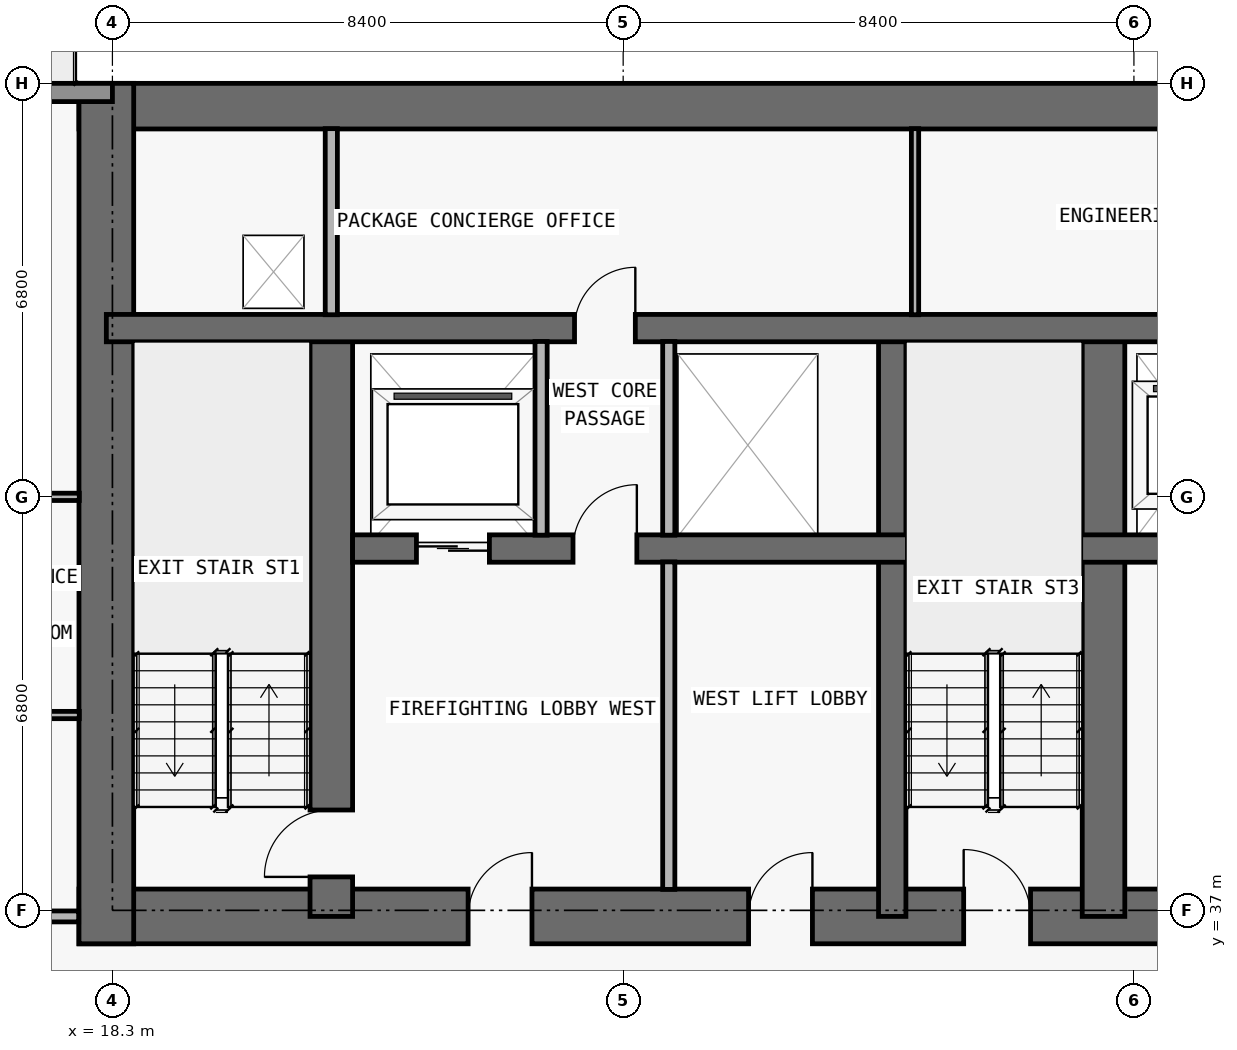
"""IFC4 building model, lengths in metres.
Left out: names, types, materials, properties, quantities, classifications, styles, units other than length and angle.
Written with IfcOpenShell. Run it as: python <this file> out.ifc"""

import sys

from ifc_helpers import new_model, si_unit, direction, frame, frame_2d, origin, place, context, subcontext, project, spatial, rectangle, extrude, element, fill, save


model = new_model("IFC4")
c1 = context("Model", 3, precision=1e-05, world=origin(), true_north=direction((0.0, 1.0)))
c2 = subcontext(c1, "Body", "Model", "MODEL_VIEW")
j1 = project(units=[si_unit("LENGTHUNIT", "METRE"), si_unit("PLANEANGLEUNIT", "RADIAN")], contexts=[c1])
p1 = place(None, origin())
s1 = spatial("IfcSite", under=j1, at=p1, CompositionType="ELEMENT")
p2 = place(p1, origin())
s2 = spatial("IfcBuilding", under=s1, at=p2, CompositionType="ELEMENT")
p3 = place(p2, frame((0.0, 0.0, 76.2)))
s3 = spatial("IfcBuildingStorey", under=s2, at=p3, CompositionType="ELEMENT", Elevation=76.2)
p4 = place(p3, frame((17.75, 36.9, 0.0), z_axis=(0.0, 0.0, 1.0), x_axis=(1.0, 0.0, 0.0)))
e1 = element("IfcWall", 1, at=p4, inside=s3, PredefinedType="SHEAR", context=c2, shape_type="SweptSolid", body=[
    extrude(rectangle(XDim=42.3, YDim=0.9, at=frame_2d((21.15, 0.0))), origin(), (0.0, 0.0, 1.0), 3.0),
])
p5 = place(p4, frame((14.55, 0.0, 0.0)))
e2 = element("IfcOpeningElement", 2, at=p5, cuts=e1, PredefinedType="OPENING", context=c2, shape_type="SweptSolid", body=[
    extrude(rectangle(XDim=1.1, YDim=2.15, at=frame_2d((0.55, 1.075))), frame((0.0, 0.46, 0.0), z_axis=(0.0, -1.0, 0.0), x_axis=(1.0, 0.0, 0.0)), (0.0, 0.0, 1.0), 0.92),
])
p6 = place(p4, frame((6.4, 0.0, 0.0)))
e3 = element("IfcOpeningElement", 3, at=p6, cuts=e1, PredefinedType="OPENING", context=c2, shape_type="SweptSolid", body=[
    extrude(rectangle(XDim=1.05, YDim=2.15, at=frame_2d((0.525, 1.075))), frame((0.0, 0.46, 0.0), z_axis=(0.0, -1.0, 0.0), x_axis=(1.0, 0.0, 0.0)), (0.0, 0.0, 1.0), 0.92),
])
p7 = place(p4, frame((34.9, 0.0, 0.0)))
e4 = element("IfcOpeningElement", 4, at=p7, cuts=e1, PredefinedType="OPENING", context=c2, shape_type="SweptSolid", body=[
    extrude(rectangle(XDim=1.05, YDim=2.15, at=frame_2d((0.525, 1.075))), frame((0.0, 0.46, 0.0), z_axis=(0.0, -1.0, 0.0), x_axis=(1.0, 0.0, 0.0)), (0.0, 0.0, 1.0), 0.92),
])
p8 = place(p4, frame((11.012, 0.0, 0.0)))
e5 = element("IfcOpeningElement", 5, at=p8, cuts=e1, PredefinedType="OPENING", context=c2, shape_type="SweptSolid", body=[
    extrude(rectangle(XDim=1.05, YDim=2.15, at=frame_2d((0.525, 1.075))), frame((0.0, 0.46, 0.0), z_axis=(0.0, -1.0, 0.0), x_axis=(1.0, 0.0, 0.0)), (0.0, 0.0, 1.0), 0.92),
])
p9 = place(p4, frame((24.25, 0.0, 0.0)))
e6 = element("IfcOpeningElement", 6, at=p9, cuts=e1, PredefinedType="OPENING", context=c2, shape_type="SweptSolid", body=[
    extrude(rectangle(XDim=1.05, YDim=2.15, at=frame_2d((0.525, 1.075))), frame((0.0, 0.46, 0.0), z_axis=(0.0, -1.0, 0.0), x_axis=(1.0, 0.0, 0.0)), (0.0, 0.0, 1.0), 0.92),
])
p10 = place(p3, frame((17.75, 50.225, 0.0), z_axis=(0.0, 0.0, 1.0), x_axis=(1.0, 0.0, 0.0)))
e7 = element("IfcWall", 7, at=p10, inside=s3, PredefinedType="SHEAR", context=c2, shape_type="SweptSolid", body=[
    extrude(rectangle(XDim=42.3, YDim=0.75, at=frame_2d((21.15, 0.0))), origin(), (0.0, 0.0, 1.0), 3.0),
])
p11 = place(p3, frame((18.2, 36.45, 0.0), z_axis=(0.0, 0.0, 1.0), x_axis=(0.0, 1.0, 0.0)))
e8 = element("IfcWall", 8, at=p11, inside=s3, PredefinedType="SHEAR", context=c2, shape_type="SweptSolid", body=[
    extrude(rectangle(XDim=14.15, YDim=0.9, at=frame_2d((7.075, 0.0))), origin(), (0.0, 0.0, 1.0), 3.0),
])
p12 = place(p3, frame((21.9, 36.9, 0.0), z_axis=(0.0, 0.0, 1.0), x_axis=(0.0, 1.0, 0.0)))
e9 = element("IfcWall", 9, at=p12, inside=s3, PredefinedType="SHEAR", context=c2, shape_type="SweptSolid", body=[
    extrude(rectangle(XDim=9.675, YDim=0.7, at=frame_2d((4.837, 0.0))), origin(), (0.0, 0.0, 1.0), 3.0),
])
p13 = place(p12, frame((0.65, 0.0, 0.0)))
e10 = element("IfcOpeningElement", 10, at=p13, cuts=e9, PredefinedType="OPENING", context=c2, shape_type="SweptSolid", body=[
    extrude(rectangle(XDim=1.1, YDim=2.15, at=frame_2d((0.55, 1.075))), frame((0.0, 0.36, 0.0), z_axis=(0.0, -1.0, 0.0), x_axis=(1.0, 0.0, 0.0)), (0.0, 0.0, 1.0), 0.72),
])
p14 = place(p3, frame((31.125, 36.9, 0.0), z_axis=(0.0, 0.0, 1.0), x_axis=(0.0, 1.0, 0.0)))
e11 = element("IfcWall", 11, at=p14, inside=s3, PredefinedType="SHEAR", context=c2, shape_type="SweptSolid", body=[
    extrude(rectangle(XDim=9.675, YDim=0.45, at=frame_2d((4.837, 0.0))), origin(), (0.0, 0.0, 1.0), 3.0),
])
p15 = place(p3, frame((34.6, 36.9, 0.0), z_axis=(0.0, 0.0, 1.0), x_axis=(0.0, 1.0, 0.0)))
e12 = element("IfcWall", 12, at=p15, inside=s3, PredefinedType="SHEAR", context=c2, shape_type="SweptSolid", body=[
    extrude(rectangle(XDim=9.675, YDim=0.7, at=frame_2d((4.837, 0.0))), origin(), (0.0, 0.0, 1.0), 3.0),
])
p16 = place(p3, frame((22.25, 42.95, 0.0), z_axis=(0.0, 0.0, 1.0), x_axis=(1.0, 0.0, 0.0)))
e13 = element("IfcWall", 13, at=p16, inside=s3, PredefinedType="SHEAR", context=c2, shape_type="SweptSolid", body=[
    extrude(rectangle(XDim=33.3, YDim=0.45, at=frame_2d((16.65, 0.0))), origin(), (0.0, 0.0, 1.0), 3.0),
])
p17 = place(p16, frame((1.05, 0.0, 0.0)))
e14 = element("IfcOpeningElement", 14, at=p17, cuts=e13, PredefinedType="OPENING", context=c2, shape_type="SweptSolid", body=[
    extrude(rectangle(XDim=1.2, YDim=2.2, at=frame_2d((0.6, 1.1))), frame((0.0, 0.235, 0.0), z_axis=(0.0, -1.0, 0.0), x_axis=(1.0, 0.0, 0.0)), (0.0, 0.0, 1.0), 0.47),
])
p18 = place(p16, frame((31.05, 0.0, 0.0)))
e15 = element("IfcOpeningElement", 15, at=p18, cuts=e13, PredefinedType="OPENING", context=c2, shape_type="SweptSolid", body=[
    extrude(rectangle(XDim=1.2, YDim=2.2, at=frame_2d((0.6, 1.1))), frame((0.0, 0.235, 0.0), z_axis=(0.0, -1.0, 0.0), x_axis=(1.0, 0.0, 0.0)), (0.0, 0.0, 1.0), 0.47),
])
p19 = place(p16, frame((13.5, 0.0, 0.0)))
e16 = element("IfcOpeningElement", 16, at=p19, cuts=e13, PredefinedType="OPENING", context=c2, shape_type="SweptSolid", body=[
    extrude(rectangle(XDim=1.1, YDim=2.2, at=frame_2d((0.55, 1.1))), frame((0.0, 0.235, 0.0), z_axis=(0.0, -1.0, 0.0), x_axis=(1.0, 0.0, 0.0)), (0.0, 0.0, 1.0), 0.47),
])
p20 = place(p16, frame((16.1, 0.0, 0.0)))
e17 = element("IfcOpeningElement", 17, at=p20, cuts=e13, PredefinedType="OPENING", context=c2, shape_type="SweptSolid", body=[
    extrude(rectangle(XDim=1.1, YDim=2.2, at=frame_2d((0.55, 1.1))), frame((0.0, 0.235, 0.0), z_axis=(0.0, -1.0, 0.0), x_axis=(1.0, 0.0, 0.0)), (0.0, 0.0, 1.0), 0.47),
])
p21 = place(p16, frame((18.7, 0.0, 0.0)))
e18 = element("IfcOpeningElement", 18, at=p21, cuts=e13, PredefinedType="OPENING", context=c2, shape_type="SweptSolid", body=[
    extrude(rectangle(XDim=1.1, YDim=2.2, at=frame_2d((0.55, 1.1))), frame((0.0, 0.235, 0.0), z_axis=(0.0, -1.0, 0.0), x_axis=(1.0, 0.0, 0.0)), (0.0, 0.0, 1.0), 0.47),
])
p22 = place(p16, frame((3.625, 0.0, 0.0)))
e19 = element("IfcOpeningElement", 19, at=p22, cuts=e13, PredefinedType="OPENING", context=c2, shape_type="SweptSolid", body=[
    extrude(rectangle(XDim=1.05, YDim=2.15, at=frame_2d((0.525, 1.075))), frame((0.0, 0.235, 0.0), z_axis=(0.0, -1.0, 0.0), x_axis=(1.0, 0.0, 0.0)), (0.0, 0.0, 1.0), 0.47),
])
p23 = place(p16, frame((28.675, 0.0, 0.0)))
e20 = element("IfcOpeningElement", 20, at=p23, cuts=e13, PredefinedType="OPENING", context=c2, shape_type="SweptSolid", body=[
    extrude(rectangle(XDim=1.05, YDim=2.15, at=frame_2d((0.525, 1.075))), frame((0.0, 0.235, 0.0), z_axis=(0.0, -1.0, 0.0), x_axis=(1.0, 0.0, 0.0)), (0.0, 0.0, 1.0), 0.47),
])
p24 = place(p3, frame((18.2, 46.575, 0.0), z_axis=(0.0, 0.0, 1.0), x_axis=(1.0, 0.0, 0.0)))
e21 = element("IfcWall", 21, at=p24, inside=s3, PredefinedType="SHEAR", context=c2, shape_type="SweptSolid", body=[
    extrude(rectangle(XDim=41.4, YDim=0.45, at=frame_2d((20.7, 0.0))), origin(), (0.0, 0.0, 1.0), 3.0),
])
p25 = place(p24, frame((7.7, 0.0, 0.0)))
e22 = element("IfcOpeningElement", 22, at=p25, cuts=e21, PredefinedType="OPENING", context=c2, shape_type="SweptSolid", body=[
    extrude(rectangle(XDim=1.0, YDim=2.2, at=frame_2d((0.5, 1.1))), frame((0.0, 0.235, 0.0), z_axis=(0.0, -1.0, 0.0), x_axis=(1.0, 0.0, 0.0)), (0.0, 0.0, 1.0), 0.47),
])
p26 = place(p24, frame((32.725, 0.0, 0.0)))
e23 = element("IfcOpeningElement", 23, at=p26, cuts=e21, PredefinedType="OPENING", context=c2, shape_type="SweptSolid", body=[
    extrude(rectangle(XDim=1.05, YDim=2.15, at=frame_2d((0.525, 1.075))), frame((0.0, 0.235, 0.0), z_axis=(0.0, -1.0, 0.0), x_axis=(1.0, 0.0, 0.0)), (0.0, 0.0, 1.0), 0.47),
])
p27 = place(p3, frame((5.1, 50.45, 0.0), z_axis=(0.0, 0.0, 1.0), x_axis=(1.0, 0.0, 0.0)))
e24 = element("IfcWall", 24, at=p27, inside=s3, PredefinedType="STANDARD", context=c2, shape_type="SweptSolid", body=[
    extrude(rectangle(XDim=13.2, YDim=0.3, at=frame_2d((6.6, 0.0))), origin(), (0.0, 0.0, 1.0), 3.0),
])
p28 = place(p27, frame((5.6, 0.0, 0.0)))
e25 = element("IfcOpeningElement", 25, at=p28, cuts=e24, PredefinedType="OPENING", context=c2, shape_type="SweptSolid", body=[
    extrude(rectangle(XDim=2.0, YDim=2.3, at=frame_2d((1.0, 1.15))), frame((0.0, 0.16, 0.0), z_axis=(0.0, -1.0, 0.0), x_axis=(1.0, 0.0, 0.0)), (0.0, 0.0, 1.0), 0.32),
])
p29 = place(p3, frame((21.9, 46.795, 0.0), z_axis=(0.0, 0.0, 1.0), x_axis=(0.0, 1.0, 0.0)))
e26 = element("IfcWall", 26, at=p29, inside=s3, PredefinedType="PARTITIONING", context=c2, shape_type="SweptSolid", body=[
    extrude(rectangle(XDim=3.06, YDim=0.2, at=frame_2d((1.53, 0.0))), origin(), (0.0, 0.0, 1.0), 3.0),
])
p30 = place(p3, frame((25.35, 43.17, 0.0), z_axis=(0.0, 0.0, 1.0), x_axis=(0.0, 1.0, 0.0)))
e27 = element("IfcWall", 27, at=p30, inside=s3, PredefinedType="PARTITIONING", context=c2, shape_type="SweptSolid", body=[
    extrude(rectangle(XDim=3.185, YDim=0.2, at=frame_2d((1.593, 0.0))), origin(), (0.0, 0.0, 1.0), 3.0),
])
p31 = place(p3, frame((27.45, 37.345, 0.0), z_axis=(0.0, 0.0, 1.0), x_axis=(0.0, 1.0, 0.0)))
e28 = element("IfcWall", 28, at=p31, inside=s3, PredefinedType="PARTITIONING", context=c2, shape_type="SweptSolid", body=[
    extrude(rectangle(XDim=5.385, YDim=0.2, at=frame_2d((2.692, 0.0))), origin(), (0.0, 0.0, 1.0), 3.0),
])
p32 = place(p3, frame((27.45, 43.17, 0.0), z_axis=(0.0, 0.0, 1.0), x_axis=(0.0, 1.0, 0.0)))
e29 = element("IfcWall", 29, at=p32, inside=s3, PredefinedType="PARTITIONING", context=c2, shape_type="SweptSolid", body=[
    extrude(rectangle(XDim=3.185, YDim=0.2, at=frame_2d((1.593, 0.0))), origin(), (0.0, 0.0, 1.0), 3.0),
])
p33 = place(p3, frame((31.5, 46.795, 0.0), z_axis=(0.0, 0.0, 1.0), x_axis=(0.0, 1.0, 0.0)))
e30 = element("IfcWall", 30, at=p33, inside=s3, PredefinedType="PARTITIONING", context=c2, shape_type="SweptSolid", body=[
    extrude(rectangle(XDim=3.06, YDim=0.12, at=frame_2d((1.53, 0.0))), origin(), (0.0, 0.0, 1.0), 3.0),
])
p34 = place(p3, frame((5.1, 36.9, 0.0), z_axis=(0.0, 0.0, 1.0), x_axis=(1.0, 0.0, 0.0)))
e31 = element("IfcWall", 31, at=p34, inside=s3, PredefinedType="PARTITIONING", context=c2, shape_type="SweptSolid", body=[
    extrude(rectangle(XDim=12.645, YDim=0.18, at=frame_2d((6.323, 0.0))), origin(), (0.0, 0.0, 1.0), 3.0),
])
p35 = place(p34, frame((7.125, 0.0, 0.0)))
e32 = element("IfcOpeningElement", 32, at=p35, cuts=e31, PredefinedType="OPENING", context=c2, shape_type="SweptSolid", body=[
    extrude(rectangle(XDim=1.0, YDim=2.2, at=frame_2d((0.5, 1.1))), frame((0.0, 0.1, 0.0), z_axis=(0.0, -1.0, 0.0), x_axis=(1.0, 0.0, 0.0)), (0.0, 0.0, 1.0), 0.2),
])
p36 = place(p3, frame((15.55, 40.212, 0.0), z_axis=(0.0, 0.0, 1.0), x_axis=(1.0, 0.0, 0.0)))
e33 = element("IfcWall", 33, at=p36, inside=s3, PredefinedType="PARTITIONING", context=c2, shape_type="SweptSolid", body=[
    extrude(rectangle(XDim=2.205, YDim=0.12, at=frame_2d((1.103, 0.0))), origin(), (0.0, 0.0, 1.0), 3.0),
])
p37 = place(p3, frame((1.795, 43.8, 0.0), z_axis=(0.0, 0.0, 1.0), x_axis=(1.0, 0.0, 0.0)))
e34 = element("IfcWall", 34, at=p37, inside=s3, PredefinedType="PARTITIONING", context=c2, shape_type="SweptSolid", body=[
    extrude(rectangle(XDim=15.96, YDim=0.12, at=frame_2d((7.98, 0.0))), origin(), (0.0, 0.0, 1.0), 2.289),
])
p38 = place(p37, frame((5.255, 0.0, 0.0)))
e35 = element("IfcOpeningElement", 35, at=p38, cuts=e34, PredefinedType="OPENING", context=c2, shape_type="SweptSolid", body=[
    extrude(rectangle(XDim=0.9, YDim=2.15, at=frame_2d((0.45, 1.075))), frame((0.0, 0.07, 0.0), z_axis=(0.0, -1.0, 0.0), x_axis=(1.0, 0.0, 0.0)), (0.0, 0.0, 1.0), 0.14),
])
p39 = place(p37, frame((10.48, 0.0, 0.0)))
e36 = element("IfcOpeningElement", 36, at=p39, cuts=e34, PredefinedType="OPENING", context=c2, shape_type="SweptSolid", body=[
    extrude(rectangle(XDim=0.9, YDim=2.15, at=frame_2d((0.45, 1.075))), frame((0.0, 0.07, 0.0), z_axis=(0.0, -1.0, 0.0), x_axis=(1.0, 0.0, 0.0)), (0.0, 0.0, 1.0), 0.14),
])
p40 = place(p37, frame((14.433, 0.0, 0.0)))
e37 = element("IfcOpeningElement", 37, at=p40, cuts=e34, PredefinedType="OPENING", context=c2, shape_type="SweptSolid", body=[
    extrude(rectangle(XDim=0.85, YDim=2.1, at=frame_2d((0.425, 1.05))), frame((0.0, 0.07, 0.0), z_axis=(0.0, -1.0, 0.0), x_axis=(1.0, 0.0, 0.0)), (0.0, 0.0, 1.0), 0.14),
])
p41 = place(p17, origin())
e38 = element("IfcDoor", 38, at=p41, inside=s3, OperationType="DOUBLE_DOOR_SLIDING", PredefinedType="DOOR", context=c2, shape_type="SweptSolid", body=[
    extrude(rectangle(XDim=1.2, YDim=2.2, at=frame_2d((0.6, 1.1))), frame((0.0, 0.025, 0.0), z_axis=(0.0, -1.0, 0.0), x_axis=(1.0, 0.0, 0.0)), (0.0, 0.0, 1.0), 0.05),
])
fill(e14, e38)
p42 = place(p5, origin())
e39 = element("IfcDoor", 39, at=p42, inside=s3, OperationType="SINGLE_SWING_LEFT", PredefinedType="DOOR", context=c2, shape_type="SweptSolid", body=[
    extrude(rectangle(XDim=1.1, YDim=2.15, at=frame_2d((0.55, 1.075))), frame((0.0, 0.025, 0.0), z_axis=(0.0, -1.0, 0.0), x_axis=(1.0, 0.0, 0.0)), (0.0, 0.0, 1.0), 0.05),
])
fill(e2, e39)
p43 = place(p6, origin())
e40 = element("IfcDoor", 40, at=p43, inside=s3, OperationType="SINGLE_SWING_RIGHT", PredefinedType="DOOR", context=c2, shape_type="SweptSolid", body=[
    extrude(rectangle(XDim=1.05, YDim=2.15, at=frame_2d((0.525, 1.075))), frame((0.0, 0.025, 0.0), z_axis=(0.0, -1.0, 0.0), x_axis=(1.0, 0.0, 0.0)), (0.0, 0.0, 1.0), 0.05),
])
fill(e3, e40)
p44 = place(p13, origin())
e41 = element("IfcDoor", 41, at=p44, inside=s3, OperationType="SINGLE_SWING_LEFT", PredefinedType="DOOR", context=c2, shape_type="SweptSolid", body=[
    extrude(rectangle(XDim=1.1, YDim=2.15, at=frame_2d((0.55, 1.075))), frame((0.0, 0.025, 0.0), z_axis=(0.0, -1.0, 0.0), x_axis=(1.0, 0.0, 0.0)), (0.0, 0.0, 1.0), 0.05),
])
fill(e10, e41)
p45 = place(p22, origin())
e42 = element("IfcDoor", 42, at=p45, inside=s3, OperationType="SINGLE_SWING_RIGHT", PredefinedType="DOOR", context=c2, shape_type="SweptSolid", body=[
    extrude(rectangle(XDim=1.05, YDim=2.15, at=frame_2d((0.525, 1.075))), frame((0.0, 0.025, 0.0), z_axis=(0.0, -1.0, 0.0), x_axis=(1.0, 0.0, 0.0)), (0.0, 0.0, 1.0), 0.05),
])
fill(e19, e42)
p46 = place(p8, origin())
e43 = element("IfcDoor", 43, at=p46, inside=s3, OperationType="SINGLE_SWING_RIGHT", PredefinedType="DOOR", context=c2, shape_type="SweptSolid", body=[
    extrude(rectangle(XDim=1.05, YDim=2.15, at=frame_2d((0.525, 1.075))), frame((0.0, 0.025, 0.0), z_axis=(0.0, -1.0, 0.0), x_axis=(1.0, 0.0, 0.0)), (0.0, 0.0, 1.0), 0.05),
])
fill(e5, e43)
p47 = place(p25, origin())
e44 = element("IfcDoor", 44, at=p47, inside=s3, OperationType="SINGLE_SWING_RIGHT", PredefinedType="DOOR", context=c2, shape_type="SweptSolid", body=[
    extrude(rectangle(XDim=1.0, YDim=2.2, at=frame_2d((0.5, 1.1))), frame((0.0, 0.025, 0.0), z_axis=(0.0, -1.0, 0.0), x_axis=(1.0, 0.0, 0.0)), (0.0, 0.0, 1.0), 0.05),
])
fill(e22, e44)
save(model, sys.argv[1])
